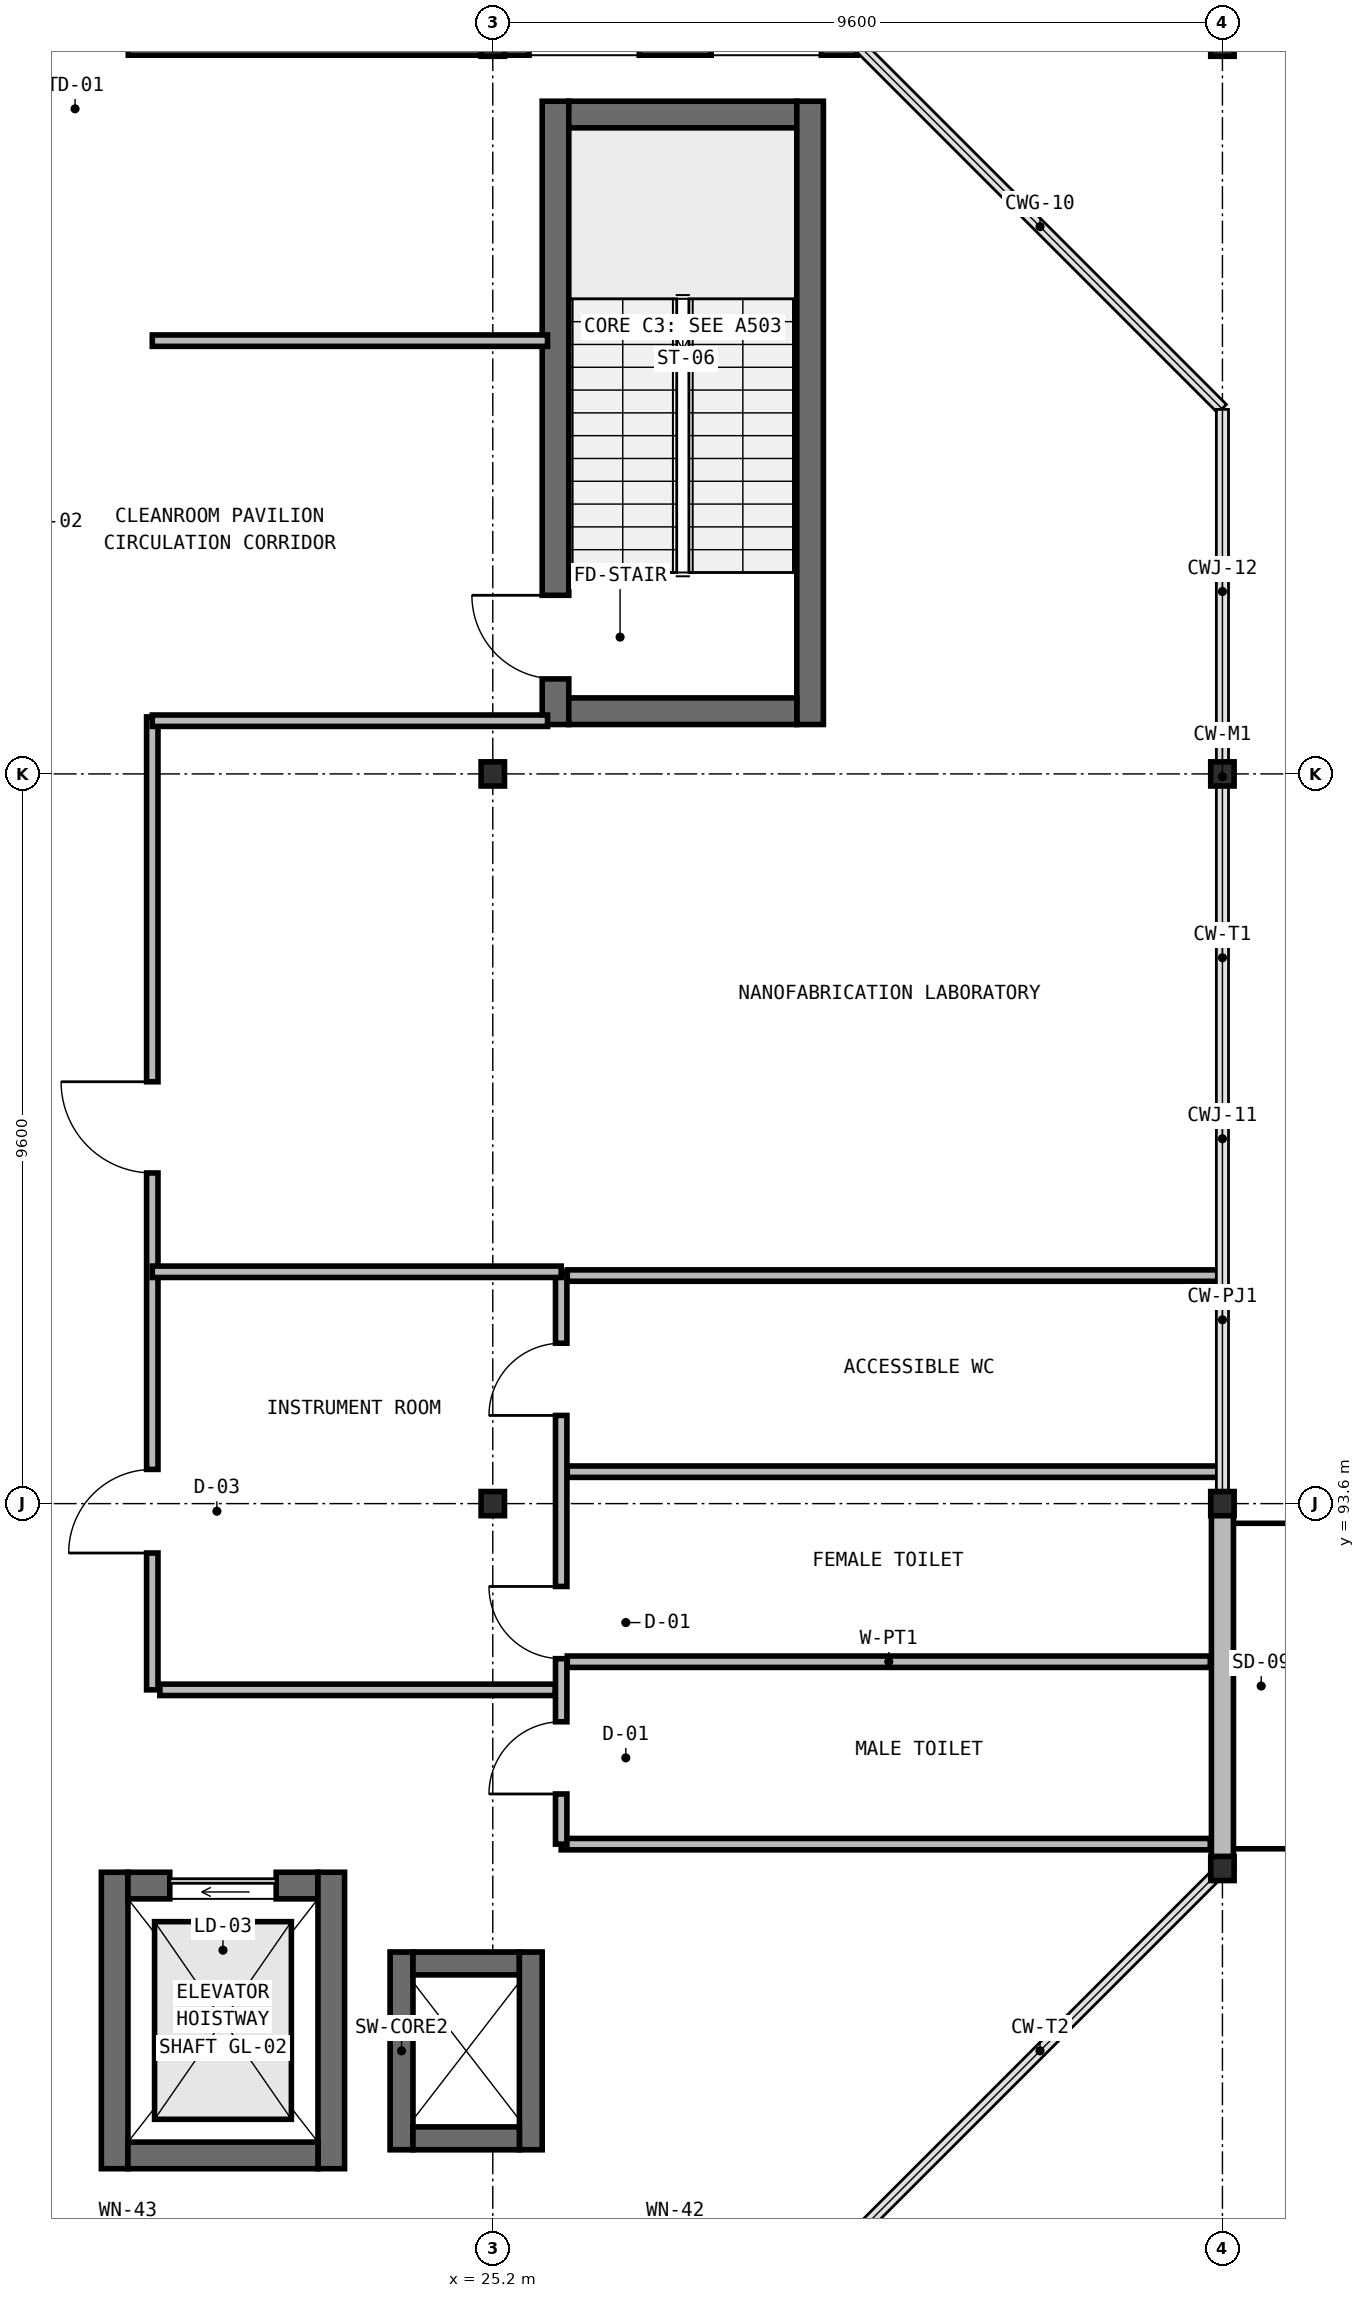
"""IFC4 building model, lengths in metres.
Left out: names, types, materials, properties, quantities, classifications, styles, units other than length and angle.
Written with IfcOpenShell. Run it as: python <this file> out.ifc"""

import sys

from ifc_helpers import new_model, si_unit, direction, frame, frame_2d, origin, origin_2d, place, context, subcontext, project, spatial, rectangle, i_section, extrude, element, fill, save


model = new_model("IFC4")
c1 = context("Model", 3, precision=1e-05, world=origin(), true_north=direction((0.0, 1.0)))
c2 = subcontext(c1, "Body", "Model", "MODEL_VIEW")
j1 = project(units=[si_unit("LENGTHUNIT", "METRE"), si_unit("PLANEANGLEUNIT", "RADIAN")], contexts=[c1])
p1 = place(None, origin())
s1 = spatial("IfcSite", under=j1, at=p1, CompositionType="ELEMENT")
p2 = place(p1, origin())
s2 = spatial("IfcBuilding", under=s1, at=p2, CompositionType="ELEMENT")
p3 = place(p2, frame((0.0, 0.0, 23.45)))
s3 = spatial("IfcBuildingStorey", under=s2, at=p3, CompositionType="ELEMENT", Elevation=23.45)
p4 = place(p3, frame((26.025, 103.85, 0.0), z_axis=(0.0, 0.0, 1.0), x_axis=(0.0, 1.0, 0.0)))
e1 = element("IfcWall", 1, at=p4, inside=s3, PredefinedType="SHEAR", context=c2, shape_type="SweptSolid", body=[
    extrude(rectangle(XDim=8.2, YDim=0.35, at=frame_2d((4.1, 0.0))), origin(), (0.0, 0.0, 1.0), 4.55),
])
p5 = place(p4, frame((0.6, 0.0, 0.0)))
e2 = element("IfcOpeningElement", 2, at=p5, cuts=e1, PredefinedType="OPENING", context=c2, shape_type="SweptSolid", body=[
    extrude(rectangle(XDim=1.1, YDim=2.15, at=frame_2d((0.55, 1.075))), frame((0.0, 0.185, 0.0), z_axis=(0.0, -1.0, 0.0), x_axis=(1.0, 0.0, 0.0)), (0.0, 0.0, 1.0), 0.37),
])
p6 = place(p3, frame((26.2, 111.875, 0.0), z_axis=(0.0, 0.0, 1.0), x_axis=(1.0, 0.0, 0.0)))
e3 = element("IfcWall", 3, at=p6, inside=s3, PredefinedType="SHEAR", context=c2, shape_type="SweptSolid", body=[
    extrude(rectangle(XDim=3.0, YDim=0.35, at=frame_2d((1.5, 0.0))), origin(), (0.0, 0.0, 1.0), 4.55),
])
p7 = place(p3, frame((29.375, 112.05, 0.0), z_axis=(0.0, 0.0, 1.0), x_axis=(0.0, -1.0, 0.0)))
e4 = element("IfcWall", 4, at=p7, inside=s3, PredefinedType="SHEAR", context=c2, shape_type="SweptSolid", body=[
    extrude(rectangle(XDim=8.2, YDim=0.35, at=frame_2d((4.1, 0.0))), origin(), (0.0, 0.0, 1.0), 4.55),
])
p8 = place(p3, frame((29.2, 104.025, 0.0), z_axis=(0.0, 0.0, 1.0), x_axis=(-1.0, 0.0, 0.0)))
e5 = element("IfcWall", 5, at=p8, inside=s3, PredefinedType="SHEAR", context=c2, shape_type="SweptSolid", body=[
    extrude(rectangle(XDim=3.0, YDim=0.35, at=frame_2d((1.5, 0.0))), origin(), (0.0, 0.0, 1.0), 4.55),
])
p9 = place(p3, frame((20.225, 84.85, 0.0), z_axis=(0.0, 0.0, 1.0), x_axis=(0.0, 1.0, 0.0)))
e6 = element("IfcWall", 6, at=p9, inside=s3, PredefinedType="SHEAR", context=c2, shape_type="SweptSolid", body=[
    extrude(rectangle(XDim=3.9, YDim=0.35, at=frame_2d((1.95, 0.0))), origin(), (0.0, 0.0, 1.0), 4.55),
])
p10 = place(p3, frame((20.4, 88.575, 0.0), z_axis=(0.0, 0.0, 1.0), x_axis=(1.0, 0.0, 0.0)))
e7 = element("IfcWall", 7, at=p10, inside=s3, PredefinedType="SHEAR", context=c2, shape_type="SweptSolid", body=[
    extrude(rectangle(XDim=2.5, YDim=0.35, at=frame_2d((1.25, 0.0))), origin(), (0.0, 0.0, 1.0), 4.55),
])
p11 = place(p10, frame((0.55, 0.0, 0.0)))
e8 = element("IfcOpeningElement", 8, at=p11, cuts=e7, PredefinedType="OPENING", context=c2, shape_type="SweptSolid", body=[
    extrude(rectangle(XDim=1.4, YDim=2.3, at=frame_2d((0.7, 1.15))), frame((0.0, 0.185, 0.0), z_axis=(0.0, -1.0, 0.0), x_axis=(1.0, 0.0, 0.0)), (0.0, 0.0, 1.0), 0.37),
])
p12 = place(p3, frame((23.075, 88.75, 0.0), z_axis=(0.0, 0.0, 1.0), x_axis=(0.0, -1.0, 0.0)))
e9 = element("IfcWall", 9, at=p12, inside=s3, PredefinedType="SHEAR", context=c2, shape_type="SweptSolid", body=[
    extrude(rectangle(XDim=3.9, YDim=0.35, at=frame_2d((1.95, 0.0))), origin(), (0.0, 0.0, 1.0), 4.55),
])
p13 = place(p3, frame((22.9, 85.025, 0.0), z_axis=(0.0, 0.0, 1.0), x_axis=(-1.0, 0.0, 0.0)))
e10 = element("IfcWall", 10, at=p13, inside=s3, PredefinedType="SHEAR", context=c2, shape_type="SweptSolid", body=[
    extrude(rectangle(XDim=2.5, YDim=0.35, at=frame_2d((1.25, 0.0))), origin(), (0.0, 0.0, 1.0), 4.55),
])
for number, where, z_axis, x_axis in (
    (11, (25.2, 93.6, 0.0), (0.0, 0.0, 1.0), (1.0, 0.0, 0.0)),
    (12, (25.2, 103.2, 0.0), (0.0, 0.0, 1.0), (1.0, 0.0, 0.0)),
    (13, (25.2, 112.8, 0.0), (0.0, 0.0, 1.0), (1.0, 0.0, 0.0)),
    (14, (34.8, 93.6, 0.0), (0.0, 0.0, 1.0), (1.0, 0.0, 0.0)),
    (15, (34.8, 103.2, 0.0), (0.0, 0.0, 1.0), (1.0, 0.0, 0.0)),
    (16, (34.8, 112.8, 0.0), (0.0, 0.0, 1.0), (1.0, 0.0, 0.0)),
    (17, (34.8, 88.8, 0.0), (0.0, 0.0, 1.0), (1.0, 0.0, 0.0)),
):
    element("IfcColumn", number, at=place(p3, frame(where, z_axis=z_axis, x_axis=x_axis)), inside=s3, PredefinedType="COLUMN", context=c2, shape_type="SweptSolid", body=[
        extrude(i_section(OverallWidth=0.308, OverallDepth=0.318, WebThickness=0.013, FlangeThickness=0.021, at=origin_2d()), origin(), (0.0, 0.0, 1.0), 4.55),
    ])
p14 = place(p3, frame((24.0, 85.1, 0.0), z_axis=(0.0, 0.0, 1.0), x_axis=(0.0, 1.0, 0.0)))
e18 = element("IfcWall", 18, at=p14, inside=s3, PredefinedType="SHEAR", context=c2, shape_type="SweptSolid", body=[
    extrude(rectangle(XDim=2.6, YDim=0.3, at=frame_2d((1.3, 0.0))), origin(), (0.0, 0.0, 1.0), 4.37),
])
p15 = place(p3, frame((24.15, 87.55, 0.0), z_axis=(0.0, 0.0, 1.0), x_axis=(1.0, 0.0, 0.0)))
e19 = element("IfcWall", 19, at=p15, inside=s3, PredefinedType="SHEAR", context=c2, shape_type="SweptSolid", body=[
    extrude(rectangle(XDim=1.4, YDim=0.3, at=frame_2d((0.7, 0.0))), origin(), (0.0, 0.0, 1.0), 4.37),
])
p16 = place(p3, frame((25.7, 87.7, 0.0), z_axis=(0.0, 0.0, 1.0), x_axis=(0.0, -1.0, 0.0)))
e20 = element("IfcWall", 20, at=p16, inside=s3, PredefinedType="SHEAR", context=c2, shape_type="SweptSolid", body=[
    extrude(rectangle(XDim=2.6, YDim=0.3, at=frame_2d((1.3, 0.0))), origin(), (0.0, 0.0, 1.0), 4.37),
])
p17 = place(p3, frame((25.55, 85.25, 0.0), z_axis=(0.0, 0.0, 1.0), x_axis=(-1.0, 0.0, 0.0)))
e21 = element("IfcWall", 21, at=p17, inside=s3, PredefinedType="SHEAR", context=c2, shape_type="SweptSolid", body=[
    extrude(rectangle(XDim=1.4, YDim=0.3, at=frame_2d((0.7, 0.0))), origin(), (0.0, 0.0, 1.0), 4.37),
])
p18 = place(p3, frame((15.604, 112.8, 0.0), z_axis=(0.0, 0.0, 1.0), x_axis=(1.0, 0.0, 0.0)))
e22 = element("IfcWall", 22, at=p18, inside=s3, PredefinedType="SOLIDWALL", context=c2, shape_type="SweptSolid", body=[
    extrude(rectangle(XDim=9.592, YDim=0.29, at=frame_2d((4.796, 0.0))), origin(), (0.0, 0.0, 1.0), 3.75),
])
p19 = place(p18, frame((3.4, 0.0, 0.0)))
e23 = element("IfcOpeningElement", 23, at=p19, cuts=e22, PredefinedType="OPENING", context=c2, shape_type="SweptSolid", body=[
    extrude(rectangle(XDim=1.4, YDim=2.2, at=frame_2d((0.7, 1.1))), frame((0.0, 0.155, 0.0), z_axis=(0.0, -1.0, 0.0), x_axis=(1.0, 0.0, 0.0)), (0.0, 0.0, 1.0), 0.31),
])
p20 = place(p3, frame((25.204, 112.8, 0.0), z_axis=(0.0, 0.0, 1.0), x_axis=(1.0, 0.0, 0.0)))
e24 = element("IfcWall", 24, at=p20, inside=s3, PredefinedType="SOLIDWALL", context=c2, shape_type="SweptSolid", body=[
    extrude(rectangle(XDim=4.792, YDim=0.29, at=frame_2d((2.396, 0.0))), origin(), (0.0, 0.0, 1.0), 3.75),
])
p21 = place(p20, frame((0.473, 0.0, 0.95)))
e25 = element("IfcOpeningElement", 25, at=p21, cuts=e24, PredefinedType="OPENING", context=c2, shape_type="SweptSolid", body=[
    extrude(rectangle(XDim=1.45, YDim=1.59, at=frame_2d((0.725, 0.795))), frame((0.0, 0.155, 0.0), z_axis=(0.0, -1.0, 0.0), x_axis=(1.0, 0.0, 0.0)), (0.0, 0.0, 1.0), 0.31),
])
p22 = place(p20, frame((2.869, 0.0, 0.95)))
e26 = element("IfcOpeningElement", 26, at=p22, cuts=e24, PredefinedType="OPENING", context=c2, shape_type="SweptSolid", body=[
    extrude(rectangle(XDim=1.45, YDim=1.59, at=frame_2d((0.725, 0.795))), frame((0.0, 0.155, 0.0), z_axis=(0.0, -1.0, 0.0), x_axis=(1.0, 0.0, 0.0)), (0.0, 0.0, 1.0), 0.31),
])
p23 = place(p3, frame((34.8, 93.596, 0.0), z_axis=(0.0, 0.0, 1.0), x_axis=(0.0, -1.0, 0.0)))
e27 = element("IfcWall", 27, at=p23, inside=s3, PredefinedType="SOLIDWALL", context=c2, shape_type="SweptSolid", body=[
    extrude(rectangle(XDim=4.792, YDim=0.29, at=frame_2d((2.396, 0.0))), origin(), (0.0, 0.0, 1.0), 4.31),
])
p24 = place(p3, frame((26.18, 91.52, 0.0), z_axis=(0.0, 0.0, 1.0), x_axis=(1.0, 0.0, 0.0)))
e28 = element("IfcWall", 28, at=p24, inside=s3, PredefinedType="PARTITIONING", context=c2, shape_type="SweptSolid", body=[
    extrude(rectangle(XDim=8.46, YDim=0.15, at=frame_2d((4.23, 0.0))), origin(), (0.0, 0.0, 1.0), 4.3),
])
for number, where, z_axis, x_axis in (
    (29, (26.18, 94.02, 0.0), (0.0, 0.0, 1.0), (1.0, 0.0, 0.0)),
    (30, (26.18, 96.6, 0.0), (0.0, 0.0, 1.0), (1.0, 0.0, 0.0)),
):
    element("IfcWall", number, at=place(p3, frame(where, z_axis=z_axis, x_axis=x_axis)), inside=s3, PredefinedType="PARTITIONING", context=c2, shape_type="SweptSolid", body=[
        extrude(rectangle(XDim=8.56, YDim=0.15, at=frame_2d((4.28, 0.0))), origin(), (0.0, 0.0, 1.0), 4.3),
    ])
p25 = place(p3, frame((26.1, 89.12, 0.0), z_axis=(0.0, 0.0, 1.0), x_axis=(1.0, 0.0, 0.0)))
e31 = element("IfcWall", 31, at=p25, inside=s3, PredefinedType="PARTITIONING", context=c2, shape_type="SweptSolid", body=[
    extrude(rectangle(XDim=8.54, YDim=0.15, at=frame_2d((4.27, 0.0))), origin(), (0.0, 0.0, 1.0), 4.3),
])
p26 = place(p3, frame((26.1, 89.12, 0.0), z_axis=(0.0, 0.0, 1.0), x_axis=(0.0, 1.0, 0.0)))
e32 = element("IfcWall", 32, at=p26, inside=s3, PredefinedType="PARTITIONING", context=c2, shape_type="SweptSolid", body=[
    extrude(rectangle(XDim=7.53, YDim=0.15, at=frame_2d((3.765, 0.0))), origin(), (0.0, 0.0, 1.0), 4.3),
])
p27 = place(p26, frame((0.66, 0.0, 0.0)))
e33 = element("IfcOpeningElement", 33, at=p27, cuts=e32, PredefinedType="OPENING", context=c2, shape_type="SweptSolid", body=[
    extrude(rectangle(XDim=0.95, YDim=2.1, at=frame_2d((0.475, 1.05))), frame((0.0, 0.085, 0.0), z_axis=(0.0, -1.0, 0.0), x_axis=(1.0, 0.0, 0.0)), (0.0, 0.0, 1.0), 0.17),
])
p28 = place(p26, frame((2.44, 0.0, 0.0)))
e34 = element("IfcOpeningElement", 34, at=p28, cuts=e32, PredefinedType="OPENING", context=c2, shape_type="SweptSolid", body=[
    extrude(rectangle(XDim=0.95, YDim=2.1, at=frame_2d((0.475, 1.05))), frame((0.0, 0.085, 0.0), z_axis=(0.0, -1.0, 0.0), x_axis=(1.0, 0.0, 0.0)), (0.0, 0.0, 1.0), 0.17),
])
p29 = place(p26, frame((5.64, 0.0, 0.0)))
e35 = element("IfcOpeningElement", 35, at=p29, cuts=e32, PredefinedType="OPENING", context=c2, shape_type="SweptSolid", body=[
    extrude(rectangle(XDim=0.95, YDim=2.1, at=frame_2d((0.475, 1.05))), frame((0.0, 0.085, 0.0), z_axis=(0.0, -1.0, 0.0), x_axis=(1.0, 0.0, 0.0)), (0.0, 0.0, 1.0), 0.17),
])
p30 = place(p3, frame((20.72, 108.9, 0.0), z_axis=(0.0, 0.0, 1.0), x_axis=(1.0, 0.0, 0.0)))
e36 = element("IfcWall", 36, at=p30, inside=s3, PredefinedType="PARTITIONING", context=c2, shape_type="SweptSolid", body=[
    extrude(rectangle(XDim=5.2, YDim=0.15, at=frame_2d((2.6, 0.0))), origin(), (0.0, 0.0, 1.0), 4.3),
])
p31 = place(p3, frame((20.72, 91.15, 0.0), z_axis=(0.0, 0.0, 1.0), x_axis=(0.0, 1.0, 0.0)))
e37 = element("IfcWall", 37, at=p31, inside=s3, PredefinedType="PARTITIONING", context=c2, shape_type="SweptSolid", body=[
    extrude(rectangle(XDim=12.8, YDim=0.15, at=frame_2d((6.4, 0.0))), origin(), (0.0, 0.0, 1.0), 4.3),
])
p32 = place(p31, frame((1.8, 0.0, 0.0)))
e38 = element("IfcOpeningElement", 38, at=p32, cuts=e37, PredefinedType="OPENING", context=c2, shape_type="SweptSolid", body=[
    extrude(rectangle(XDim=1.1, YDim=2.2, at=frame_2d((0.55, 1.1))), frame((0.0, 0.085, 0.0), z_axis=(0.0, -1.0, 0.0), x_axis=(1.0, 0.0, 0.0)), (0.0, 0.0, 1.0), 0.17),
])
p33 = place(p31, frame((6.8, 0.0, 0.0)))
e39 = element("IfcOpeningElement", 39, at=p33, cuts=e37, PredefinedType="OPENING", context=c2, shape_type="SweptSolid", body=[
    extrude(rectangle(XDim=1.2, YDim=2.2, at=frame_2d((0.6, 1.1))), frame((0.0, 0.085, 0.0), z_axis=(0.0, -1.0, 0.0), x_axis=(1.0, 0.0, 0.0)), (0.0, 0.0, 1.0), 0.17),
])
for number, where, z_axis, x_axis in (
    (40, (20.82, 91.15, 0.0), (0.0, 0.0, 1.0), (1.0, 0.0, 0.0)),
    (41, (20.72, 103.9, 0.0), (0.0, 0.0, 1.0), (1.0, 0.0, 0.0)),
):
    element("IfcWall", number, at=place(p3, frame(where, z_axis=z_axis, x_axis=x_axis)), inside=s3, PredefinedType="PARTITIONING", context=c2, shape_type="SweptSolid", body=[
        extrude(rectangle(XDim=5.2, YDim=0.15, at=frame_2d((2.6, 0.0))), origin(), (0.0, 0.0, 1.0), 4.3),
    ])
p34 = place(p3, frame((20.72, 96.65, 0.0), z_axis=(0.0, 0.0, 1.0), x_axis=(1.0, 0.0, 0.0)))
e42 = element("IfcWall", 42, at=p34, inside=s3, PredefinedType="PARTITIONING", context=c2, shape_type="SweptSolid", body=[
    extrude(rectangle(XDim=5.38, YDim=0.15, at=frame_2d((2.69, 0.0))), origin(), (0.0, 0.0, 1.0), 4.3),
])
p35 = place(p5, origin())
e43 = element("IfcDoor", 43, at=p35, inside=s3, OperationType="SINGLE_SWING_RIGHT", PredefinedType="DOOR", context=c2, shape_type="SweptSolid", body=[
    extrude(rectangle(XDim=1.1, YDim=2.15, at=frame_2d((0.55, 1.075))), frame((0.0, 0.025, 0.0), z_axis=(0.0, -1.0, 0.0), x_axis=(1.0, 0.0, 0.0)), (0.0, 0.0, 1.0), 0.05),
])
fill(e2, e43)
p36 = place(p11, origin())
e44 = element("IfcDoor", 44, at=p36, inside=s3, OperationType="SLIDING_TO_LEFT", PredefinedType="USERDEFINED", context=c2, shape_type="SweptSolid", body=[
    extrude(rectangle(XDim=1.4, YDim=2.3, at=frame_2d((0.7, 1.15))), frame((0.0, 0.025, 0.0), z_axis=(0.0, -1.0, 0.0), x_axis=(1.0, 0.0, 0.0)), (0.0, 0.0, 1.0), 0.05),
])
fill(e8, e44)
p37 = place(p27, origin())
e45 = element("IfcDoor", 45, at=p37, inside=s3, OperationType="SINGLE_SWING_LEFT", PredefinedType="DOOR", context=c2, shape_type="SweptSolid", body=[
    extrude(rectangle(XDim=0.95, YDim=2.1, at=frame_2d((0.475, 1.05))), frame((0.0, 0.025, 0.0), z_axis=(0.0, -1.0, 0.0), x_axis=(1.0, 0.0, 0.0)), (0.0, 0.0, 1.0), 0.05),
])
fill(e33, e45)
p38 = place(p28, origin())
e46 = element("IfcDoor", 46, at=p38, inside=s3, OperationType="SINGLE_SWING_RIGHT", PredefinedType="DOOR", context=c2, shape_type="SweptSolid", body=[
    extrude(rectangle(XDim=0.95, YDim=2.1, at=frame_2d((0.475, 1.05))), frame((0.0, 0.025, 0.0), z_axis=(0.0, -1.0, 0.0), x_axis=(1.0, 0.0, 0.0)), (0.0, 0.0, 1.0), 0.05),
])
fill(e34, e46)
p39 = place(p29, origin())
e47 = element("IfcDoor", 47, at=p39, inside=s3, OperationType="SINGLE_SWING_LEFT", PredefinedType="DOOR", context=c2, shape_type="SweptSolid", body=[
    extrude(rectangle(XDim=0.95, YDim=2.1, at=frame_2d((0.475, 1.05))), frame((0.0, 0.025, 0.0), z_axis=(0.0, -1.0, 0.0), x_axis=(1.0, 0.0, 0.0)), (0.0, 0.0, 1.0), 0.05),
])
fill(e35, e47)
p40 = place(p32, origin())
e48 = element("IfcDoor", 48, at=p40, inside=s3, OperationType="SINGLE_SWING_LEFT", PredefinedType="DOOR", context=c2, shape_type="SweptSolid", body=[
    extrude(rectangle(XDim=1.1, YDim=2.2, at=frame_2d((0.55, 1.1))), frame((0.0, 0.025, 0.0), z_axis=(0.0, -1.0, 0.0), x_axis=(1.0, 0.0, 0.0)), (0.0, 0.0, 1.0), 0.05),
])
fill(e38, e48)
p41 = place(p33, origin())
e49 = element("IfcDoor", 49, at=p41, inside=s3, OperationType="SINGLE_SWING_RIGHT", PredefinedType="DOOR", context=c2, shape_type="SweptSolid", body=[
    extrude(rectangle(XDim=1.2, YDim=2.2, at=frame_2d((0.6, 1.1))), frame((0.0, 0.025, 0.0), z_axis=(0.0, -1.0, 0.0), x_axis=(1.0, 0.0, 0.0)), (0.0, 0.0, 1.0), 0.05),
])
fill(e39, e49)
save(model, sys.argv[1])
